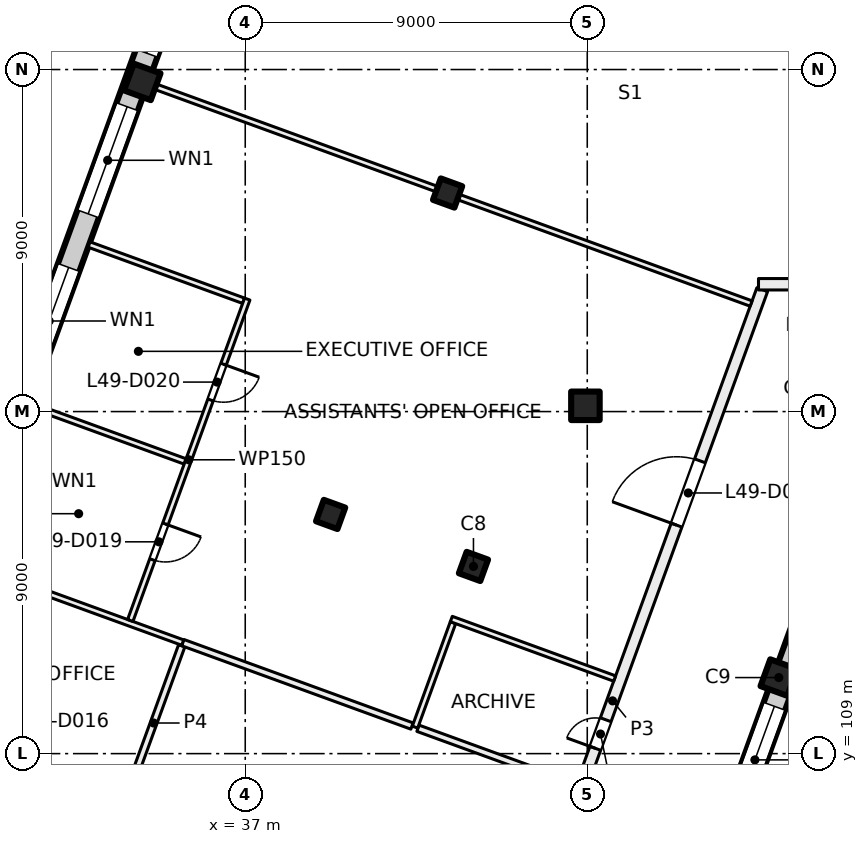
"""IFC4 building model, lengths in metres.
Left out: names, types, materials, properties, quantities, classifications, styles, units other than length and angle.
Written with IfcOpenShell. Run it as: python <this file> out.ifc"""

import sys

from ifc_helpers import new_model, si_unit, direction, frame, frame_2d, origin, origin_2d, place, context, subcontext, project, spatial, rectangle, extrude, element, fill, save


model = new_model("IFC4")
c1 = context("Model", 3, precision=1e-05, world=origin(), true_north=direction((0.0, 1.0)))
c2 = subcontext(c1, "Body", "Model", "MODEL_VIEW")
j1 = project(units=[si_unit("LENGTHUNIT", "METRE"), si_unit("PLANEANGLEUNIT", "RADIAN")], contexts=[c1])
p1 = place(None, origin())
s1 = spatial("IfcSite", under=j1, at=p1, CompositionType="ELEMENT")
p2 = place(p1, origin())
s2 = spatial("IfcBuilding", under=s1, at=p2, CompositionType="ELEMENT")
p3 = place(p2, frame((0.0, 0.0, 208.0)))
s3 = spatial("IfcBuildingStorey", under=s2, at=p3, CompositionType="ELEMENT", Elevation=208.0)
p4 = place(p3, frame((45.952, 118.152, 0.0), z_axis=(0.0, 0.0, 1.0), x_axis=(1.0, 0.0, 0.0)))
e1 = element("IfcColumn", 1, at=p4, inside=s3, PredefinedType="COLUMN", context=c2, shape_type="SweptSolid", body=[
    extrude(rectangle(XDim=0.75, YDim=0.75, at=origin_2d()), origin(), (0.0, 0.0, 1.0), 4.0),
])
for number, where, z_axis, x_axis in (
    (2, (43.006, 113.925, 0.0), (0.0, 0.0, 1.0), (-0.342, -0.94, 0.0)),
    (3, (42.325, 123.751, 0.0), (0.0, 0.0, 1.0), (-0.342, -0.94, 0.0)),
    (4, (39.247, 115.293, 0.0), (0.0, 0.0, 1.0), (-0.342, -0.94, 0.0)),
):
    element("IfcColumn", number, at=place(p3, frame(where, z_axis=z_axis, x_axis=x_axis)), inside=s3, PredefinedType="COLUMN", context=c2, shape_type="SweptSolid", body=[
        extrude(rectangle(XDim=0.6, YDim=0.6, at=origin_2d()), origin(), (0.0, 0.0, 1.0), 4.0),
    ])
for number, where, z_axis, x_axis in (
    (5, (51.04, 111.001, 0.0), (0.0, 0.0, 1.0), (-0.342, -0.94, 0.0)),
    (6, (34.291, 126.675, 0.0), (0.0, 0.0, 1.0), (-0.342, -0.94, 0.0)),
):
    element("IfcColumn", number, at=place(p3, frame(where, z_axis=z_axis, x_axis=x_axis)), inside=s3, PredefinedType="COLUMN", context=c2, shape_type="SweptSolid", body=[
        extrude(rectangle(XDim=0.75, YDim=0.75, at=origin_2d()), origin(), (0.0, 0.0, 1.0), 4.0),
    ])
p5 = place(p3, frame((52.212, 113.783, 0.0), z_axis=(0.0, 0.0, 1.0), x_axis=(-0.34202521188, -0.939690775968, 0.0)))
e7 = element("IfcWall", 7, at=p5, inside=s3, PredefinedType="SOLIDWALL", context=c2, shape_type="SweptSolid", body=[
    extrude(rectangle(XDim=21.745, YDim=0.6, at=frame_2d((10.873, 0.0))), origin(), (0.0, 0.0, 1.0), 3.625),
])
p6 = place(p5, frame((3.765, 0.0, 0.9)))
e8 = element("IfcOpeningElement", 8, at=p6, cuts=e7, PredefinedType="OPENING", context=c2, shape_type="SweptSolid", body=[
    extrude(rectangle(XDim=3.0, YDim=2.4, at=frame_2d((1.5, 1.2))), frame((0.0, 0.31, 0.0), z_axis=(0.0, -1.0, 0.0), x_axis=(1.0, 0.0, 0.0)), (0.0, 0.0, 1.0), 0.62),
])
p7 = place(p5, frame((8.265, 0.0, 0.9)))
e9 = element("IfcOpeningElement", 9, at=p7, cuts=e7, PredefinedType="OPENING", context=c2, shape_type="SweptSolid", body=[
    extrude(rectangle(XDim=3.0, YDim=2.4, at=frame_2d((1.5, 1.2))), frame((0.0, 0.31, 0.0), z_axis=(0.0, -1.0, 0.0), x_axis=(1.0, 0.0, 0.0)), (0.0, 0.0, 1.0), 0.62),
])
p8 = place(p5, frame((12.765, 0.0, 0.9)))
e10 = element("IfcOpeningElement", 10, at=p8, cuts=e7, PredefinedType="OPENING", context=c2, shape_type="SweptSolid", body=[
    extrude(rectangle(XDim=3.0, YDim=2.4, at=frame_2d((1.5, 1.2))), frame((0.0, 0.31, 0.0), z_axis=(0.0, -1.0, 0.0), x_axis=(1.0, 0.0, 0.0)), (0.0, 0.0, 1.0), 0.62),
])
p9 = place(p5, frame((17.265, 0.0, 0.9)))
e11 = element("IfcOpeningElement", 11, at=p9, cuts=e7, PredefinedType="OPENING", context=c2, shape_type="SweptSolid", body=[
    extrude(rectangle(XDim=3.0, YDim=2.4, at=frame_2d((1.5, 1.2))), frame((0.0, 0.31, 0.0), z_axis=(0.0, -1.0, 0.0), x_axis=(1.0, 0.0, 0.0)), (0.0, 0.0, 1.0), 0.62),
])
p10 = place(p3, frame((24.666, 100.669, 0.0), z_axis=(0.0, 0.0, 1.0), x_axis=(0.34201964167, 0.939692803373, 0.0)))
e12 = element("IfcWall", 12, at=p10, inside=s3, PredefinedType="SOLIDWALL", context=c2, shape_type="SweptSolid", body=[
    extrude(rectangle(XDim=32.884, YDim=0.6, at=frame_2d((16.442, 0.0))), origin(), (0.0, 0.0, 1.0), 3.625),
])
p11 = place(p10, frame((1.48, 0.0, 0.9)))
e13 = element("IfcOpeningElement", 13, at=p11, cuts=e12, PredefinedType="OPENING", context=c2, shape_type="SweptSolid", body=[
    extrude(rectangle(XDim=3.0, YDim=2.4, at=frame_2d((1.5, 1.2))), frame((0.0, 0.31, 0.0), z_axis=(0.0, -1.0, 0.0), x_axis=(1.0, 0.0, 0.0)), (0.0, 0.0, 1.0), 0.62),
])
p12 = place(p10, frame((5.98, 0.0, 0.9)))
e14 = element("IfcOpeningElement", 14, at=p12, cuts=e12, PredefinedType="OPENING", context=c2, shape_type="SweptSolid", body=[
    extrude(rectangle(XDim=3.0, YDim=2.4, at=frame_2d((1.5, 1.2))), frame((0.0, 0.31, 0.0), z_axis=(0.0, -1.0, 0.0), x_axis=(1.0, 0.0, 0.0)), (0.0, 0.0, 1.0), 0.62),
])
p13 = place(p10, frame((10.48, 0.0, 0.9)))
e15 = element("IfcOpeningElement", 15, at=p13, cuts=e12, PredefinedType="OPENING", context=c2, shape_type="SweptSolid", body=[
    extrude(rectangle(XDim=3.0, YDim=2.4, at=frame_2d((1.5, 1.2))), frame((0.0, 0.31, 0.0), z_axis=(0.0, -1.0, 0.0), x_axis=(1.0, 0.0, 0.0)), (0.0, 0.0, 1.0), 0.62),
])
p14 = place(p10, frame((14.98, 0.0, 0.9)))
e16 = element("IfcOpeningElement", 16, at=p14, cuts=e12, PredefinedType="OPENING", context=c2, shape_type="SweptSolid", body=[
    extrude(rectangle(XDim=3.0, YDim=2.4, at=frame_2d((1.5, 1.2))), frame((0.0, 0.31, 0.0), z_axis=(0.0, -1.0, 0.0), x_axis=(1.0, 0.0, 0.0)), (0.0, 0.0, 1.0), 0.62),
])
p15 = place(p10, frame((19.48, 0.0, 0.9)))
e17 = element("IfcOpeningElement", 17, at=p15, cuts=e12, PredefinedType="OPENING", context=c2, shape_type="SweptSolid", body=[
    extrude(rectangle(XDim=3.0, YDim=2.4, at=frame_2d((1.5, 1.2))), frame((0.0, 0.31, 0.0), z_axis=(0.0, -1.0, 0.0), x_axis=(1.0, 0.0, 0.0)), (0.0, 0.0, 1.0), 0.62),
])
p16 = place(p10, frame((23.98, 0.0, 0.9)))
e18 = element("IfcOpeningElement", 18, at=p16, cuts=e12, PredefinedType="OPENING", context=c2, shape_type="SweptSolid", body=[
    extrude(rectangle(XDim=3.0, YDim=2.4, at=frame_2d((1.5, 1.2))), frame((0.0, 0.31, 0.0), z_axis=(0.0, -1.0, 0.0), x_axis=(1.0, 0.0, 0.0)), (0.0, 0.0, 1.0), 0.62),
])
p17 = place(p10, frame((28.48, 0.0, 0.9)))
e19 = element("IfcOpeningElement", 19, at=p17, cuts=e12, PredefinedType="OPENING", context=c2, shape_type="SweptSolid", body=[
    extrude(rectangle(XDim=3.0, YDim=2.4, at=frame_2d((1.5, 1.2))), frame((0.0, 0.31, 0.0), z_axis=(0.0, -1.0, 0.0), x_axis=(1.0, 0.0, 0.0)), (0.0, 0.0, 1.0), 0.62),
])
p18 = place(p3, frame((29.814, 113.938, 0.0), z_axis=(0.0, 0.0, 1.0), x_axis=(0.939699162475, -0.342002169647, 0.0)))
e20 = element("IfcWall", 20, at=p18, inside=s3, PredefinedType="PARTITIONING", context=c2, shape_type="SweptSolid", body=[
    extrude(rectangle(XDim=5.901, YDim=0.15, at=frame_2d((2.95, 0.0))), origin(), (0.0, 0.0, 1.0), 3.625),
])
p19 = place(p3, frame((31.353, 118.166, 0.0), z_axis=(0.0, 0.0, 1.0), x_axis=(0.939803311208, -0.341715870634, 0.0)))
e21 = element("IfcWall", 21, at=p19, inside=s3, PredefinedType="PARTITIONING", context=c2, shape_type="SweptSolid", body=[
    extrude(rectangle(XDim=4.325, YDim=0.15, at=frame_2d((2.163, 0.0))), origin(), (0.0, 0.0, 1.0), 3.625),
])
p20 = place(p3, frame((32.892, 122.395, 0.0), z_axis=(0.0, 0.0, 1.0), x_axis=(0.93973078783, -0.341915262023, 0.0)))
e22 = element("IfcWall", 22, at=p20, inside=s3, PredefinedType="PARTITIONING", context=c2, shape_type="SweptSolid", body=[
    extrude(rectangle(XDim=4.326, YDim=0.15, at=frame_2d((2.163, 0.0))), origin(), (0.0, 0.0, 1.0), 3.625),
])
p21 = place(p3, frame((33.819, 107.691, 0.0), z_axis=(0.0, 0.0, 1.0), x_axis=(-0.939684641746, 0.342042064762, 0.0)))
e23 = element("IfcWall", 23, at=p21, inside=s3, PredefinedType="PARTITIONING", context=c2, shape_type="SweptSolid", body=[
    extrude(rectangle(XDim=5.9, YDim=0.15, at=frame_2d((2.95, 0.0))), origin(), (0.0, 0.0, 1.0), 3.625),
])
p22 = place(p21, frame((2.45, 0.0, 0.0)))
e24 = element("IfcOpeningElement", 24, at=p22, cuts=e23, PredefinedType="OPENING", context=c2, shape_type="SweptSolid", body=[
    extrude(rectangle(XDim=1.0, YDim=2.1, at=frame_2d((0.5, 1.05))), frame((0.0, 0.085, 0.0), z_axis=(0.0, -1.0, 0.0), x_axis=(1.0, 0.0, 0.0)), (0.0, 0.0, 1.0), 0.17),
])
p23 = place(p3, frame((35.329, 111.838, 0.0), z_axis=(0.0, 0.0, 1.0), x_axis=(-0.342114607243, -0.939658233355, 0.0)))
e25 = element("IfcWall", 25, at=p23, inside=s3, PredefinedType="PARTITIONING", context=c2, shape_type="SweptSolid", body=[
    extrude(rectangle(XDim=4.326, YDim=0.175, at=frame_2d((2.163, 0.0))), origin(), (0.0, 0.0, 1.0), 3.625),
])
p24 = place(p3, frame((37.053, 120.96, 0.0), z_axis=(0.0, 0.0, 1.0), x_axis=(-0.341997891731, -0.939700719406, 0.0)))
e26 = element("IfcWall", 26, at=p24, inside=s3, PredefinedType="PARTITIONING", context=c2, shape_type="SweptSolid", body=[
    extrude(rectangle(XDim=9.0, YDim=0.15, at=frame_2d((4.5, 0.0))), origin(), (0.0, 0.0, 1.0), 3.625),
])
p25 = place(p24, frame((6.297, 0.0, 0.0)))
e27 = element("IfcOpeningElement", 27, at=p25, cuts=e26, PredefinedType="OPENING", context=c2, shape_type="SweptSolid", body=[
    extrude(rectangle(XDim=1.0, YDim=2.1, at=frame_2d((0.5, 1.05))), frame((0.0, 0.085, 0.0), z_axis=(0.0, -1.0, 0.0), x_axis=(1.0, 0.0, 0.0)), (0.0, 0.0, 1.0), 0.17),
])
p26 = place(p24, frame((1.824, 0.0, 0.0)))
e28 = element("IfcOpeningElement", 28, at=p26, cuts=e26, PredefinedType="OPENING", context=c2, shape_type="SweptSolid", body=[
    extrude(rectangle(XDim=1.0, YDim=2.1, at=frame_2d((0.5, 1.05))), frame((0.0, 0.085, 0.0), z_axis=(0.0, -1.0, 0.0), x_axis=(1.0, 0.0, 0.0)), (0.0, 0.0, 1.0), 0.17),
])
p27 = place(p3, frame((41.546, 109.667, 0.0), z_axis=(0.0, 0.0, 1.0), x_axis=(0.939704600082, -0.341987228685, 0.0)))
e29 = element("IfcWall", 29, at=p27, inside=s3, PredefinedType="PARTITIONING", context=c2, shape_type="SweptSolid", body=[
    extrude(rectangle(XDim=4.415, YDim=0.175, at=frame_2d((2.208, 0.0))), origin(), (0.0, 0.0, 1.0), 3.625),
])
p28 = place(p3, frame((41.388, 109.726, 0.0), z_axis=(0.0, 0.0, 1.0), x_axis=(-0.939720073348, 0.341944708609, 0.0)))
e30 = element("IfcWall", 30, at=p28, inside=s3, PredefinedType="PARTITIONING", context=c2, shape_type="SweptSolid", body=[
    extrude(rectangle(XDim=6.416, YDim=0.175, at=frame_2d((3.208, 0.0))), origin(), (0.0, 0.0, 1.0), 3.625),
])
p29 = place(p3, frame((42.467, 112.446, 0.0), z_axis=(0.0, 0.0, 1.0), x_axis=(-0.341850278959, -0.939754428974, 0.0)))
e31 = element("IfcWall", 31, at=p29, inside=s3, PredefinedType="PARTITIONING", context=c2, shape_type="SweptSolid", body=[
    extrude(rectangle(XDim=2.925, YDim=0.15, at=frame_2d((1.463, 0.0))), origin(), (0.0, 0.0, 1.0), 3.625),
])
p30 = place(p3, frame((42.728, 99.567, 0.0), z_axis=(0.0, 0.0, 1.0), x_axis=(0.342015412648, 0.939694342598, 0.0)))
e32 = element("IfcWall", 32, at=p30, inside=s3, PredefinedType="PARTITIONING", context=c2, shape_type="SweptSolid", body=[
    extrude(rectangle(XDim=23.031, YDim=0.3, at=frame_2d((11.516, 0.0))), origin(), (0.0, 0.0, 1.0), 3.625),
])
p31 = place(p30, frame((1.738, 0.0, 0.0)))
e33 = element("IfcOpeningElement", 33, at=p31, cuts=e32, PredefinedType="OPENING", context=c2, shape_type="SweptSolid", body=[
    extrude(rectangle(XDim=1.2, YDim=2.1, at=frame_2d((0.6, 1.05))), frame((0.0, 0.16, 0.0), z_axis=(0.0, -1.0, 0.0), x_axis=(1.0, 0.0, 0.0)), (0.0, 0.0, 1.0), 0.32),
])
p32 = place(p30, frame((10.187, 0.0, 0.0)))
e34 = element("IfcOpeningElement", 34, at=p32, cuts=e32, PredefinedType="OPENING", context=c2, shape_type="SweptSolid", body=[
    extrude(rectangle(XDim=0.8, YDim=2.1, at=frame_2d((0.4, 1.05))), frame((0.0, 0.16, 0.0), z_axis=(0.0, -1.0, 0.0), x_axis=(1.0, 0.0, 0.0)), (0.0, 0.0, 1.0), 0.32),
])
p33 = place(p30, frame((16.437, 0.0, 0.0)))
e35 = element("IfcOpeningElement", 35, at=p33, cuts=e32, PredefinedType="OPENING", context=c2, shape_type="SweptSolid", body=[
    extrude(rectangle(XDim=1.8, YDim=2.1, at=frame_2d((0.9, 1.05))), frame((0.0, 0.16, 0.0), z_axis=(0.0, -1.0, 0.0), x_axis=(1.0, 0.0, 0.0)), (0.0, 0.0, 1.0), 0.32),
])
p34 = place(p3, frame((46.721, 110.976, 0.0), z_axis=(0.0, 0.0, 1.0), x_axis=(-0.939578187104, 0.342334383781, 0.0)))
e36 = element("IfcWall", 36, at=p34, inside=s3, PredefinedType="PARTITIONING", context=c2, shape_type="SweptSolid", body=[
    extrude(rectangle(XDim=4.574, YDim=0.15, at=frame_2d((2.287, 0.0))), origin(), (0.0, 0.0, 1.0), 3.625),
])
p35 = place(p3, frame((50.312, 120.843, 0.0), z_axis=(0.0, 0.0, 1.0), x_axis=(-0.939678226331, 0.342059689177, 0.0)))
e37 = element("IfcWall", 37, at=p35, inside=s3, PredefinedType="PARTITIONING", context=c2, shape_type="SweptSolid", body=[
    extrude(rectangle(XDim=16.901, YDim=0.15, at=frame_2d((8.45, 0.0))), origin(), (0.0, 0.0, 1.0), 3.625),
])
p36 = place(p3, frame((50.506, 121.35, 0.0), z_axis=(0.0, 0.0, 1.0), x_axis=(1.0, 0.0, 0.0)))
e38 = element("IfcWall", 38, at=p36, inside=s3, PredefinedType="PARTITIONING", context=c2, shape_type="SweptSolid", body=[
    extrude(rectangle(XDim=35.332, YDim=0.3, at=frame_2d((17.666, 0.0))), origin(), (0.0, 0.0, 1.0), 3.625),
])
p37 = place(p36, frame((32.394, 0.0, 0.0)))
e39 = element("IfcOpeningElement", 39, at=p37, cuts=e38, PredefinedType="OPENING", context=c2, shape_type="SweptSolid", body=[
    extrude(rectangle(XDim=1.2, YDim=2.1, at=frame_2d((0.6, 1.05))), frame((0.0, 0.16, 0.0), z_axis=(0.0, -1.0, 0.0), x_axis=(1.0, 0.0, 0.0)), (0.0, 0.0, 1.0), 0.32),
])
p38 = place(p36, frame((28.744, 0.0, 0.0)))
e40 = element("IfcOpeningElement", 40, at=p38, cuts=e38, PredefinedType="OPENING", context=c2, shape_type="SweptSolid", body=[
    extrude(rectangle(XDim=1.0, YDim=2.1, at=frame_2d((0.5, 1.05))), frame((0.0, 0.16, 0.0), z_axis=(0.0, -1.0, 0.0), x_axis=(1.0, 0.0, 0.0)), (0.0, 0.0, 1.0), 0.32),
])
p39 = place(p36, frame((23.844, 0.0, 0.0)))
e41 = element("IfcOpeningElement", 41, at=p39, cuts=e38, PredefinedType="OPENING", context=c2, shape_type="SweptSolid", body=[
    extrude(rectangle(XDim=1.8, YDim=2.1, at=frame_2d((0.9, 1.05))), frame((0.0, 0.16, 0.0), z_axis=(0.0, -1.0, 0.0), x_axis=(1.0, 0.0, 0.0)), (0.0, 0.0, 1.0), 0.32),
])
p40 = place(p36, frame((16.744, 0.0, 0.0)))
e42 = element("IfcOpeningElement", 42, at=p40, cuts=e38, PredefinedType="OPENING", context=c2, shape_type="SweptSolid", body=[
    extrude(rectangle(XDim=1.0, YDim=2.1, at=frame_2d((0.5, 1.05))), frame((0.0, 0.16, 0.0), z_axis=(0.0, -1.0, 0.0), x_axis=(1.0, 0.0, 0.0)), (0.0, 0.0, 1.0), 0.32),
])
p41 = place(p36, frame((7.344, 0.0, 0.0)))
e43 = element("IfcOpeningElement", 43, at=p41, cuts=e38, PredefinedType="OPENING", context=c2, shape_type="SweptSolid", body=[
    extrude(rectangle(XDim=1.8, YDim=2.1, at=frame_2d((0.9, 1.05))), frame((0.0, 0.16, 0.0), z_axis=(0.0, -1.0, 0.0), x_axis=(1.0, 0.0, 0.0)), (0.0, 0.0, 1.0), 0.32),
])
p42 = place(p36, frame((1.047, 0.0, 0.0)))
e44 = element("IfcOpeningElement", 44, at=p42, cuts=e38, PredefinedType="OPENING", context=c2, shape_type="SweptSolid", body=[
    extrude(rectangle(XDim=1.8, YDim=2.1, at=frame_2d((0.9, 1.05))), frame((0.0, 0.16, 0.0), z_axis=(0.0, -1.0, 0.0), x_axis=(1.0, 0.0, 0.0)), (0.0, 0.0, 1.0), 0.32),
])
p43 = place(p6, origin())
e45 = element("IfcWindow", 45, at=p43, inside=s3, PartitioningType="SINGLE_PANEL", PredefinedType="WINDOW", context=c2, shape_type="SweptSolid", body=[
    extrude(rectangle(XDim=3.0, YDim=2.4, at=frame_2d((1.5, 1.2))), frame((0.0, 0.03, 0.0), z_axis=(0.0, -1.0, 0.0), x_axis=(1.0, 0.0, 0.0)), (0.0, 0.0, 1.0), 0.06),
])
fill(e8, e45)
p44 = place(p15, origin())
e46 = element("IfcWindow", 46, at=p44, inside=s3, PartitioningType="SINGLE_PANEL", PredefinedType="WINDOW", context=c2, shape_type="SweptSolid", body=[
    extrude(rectangle(XDim=3.0, YDim=2.4, at=frame_2d((1.5, 1.2))), frame((0.0, 0.03, 0.0), z_axis=(0.0, -1.0, 0.0), x_axis=(1.0, 0.0, 0.0)), (0.0, 0.0, 1.0), 0.06),
])
fill(e17, e46)
p45 = place(p16, origin())
e47 = element("IfcWindow", 47, at=p45, inside=s3, PartitioningType="SINGLE_PANEL", PredefinedType="WINDOW", context=c2, shape_type="SweptSolid", body=[
    extrude(rectangle(XDim=3.0, YDim=2.4, at=frame_2d((1.5, 1.2))), frame((0.0, 0.03, 0.0), z_axis=(0.0, -1.0, 0.0), x_axis=(1.0, 0.0, 0.0)), (0.0, 0.0, 1.0), 0.06),
])
fill(e18, e47)
p46 = place(p17, origin())
e48 = element("IfcWindow", 48, at=p46, inside=s3, PartitioningType="SINGLE_PANEL", PredefinedType="WINDOW", context=c2, shape_type="SweptSolid", body=[
    extrude(rectangle(XDim=3.0, YDim=2.4, at=frame_2d((1.5, 1.2))), frame((0.0, 0.03, 0.0), z_axis=(0.0, -1.0, 0.0), x_axis=(1.0, 0.0, 0.0)), (0.0, 0.0, 1.0), 0.06),
])
fill(e19, e48)
p47 = place(p32, origin())
e49 = element("IfcDoor", 49, at=p47, inside=s3, OperationType="SINGLE_SWING_LEFT", PredefinedType="DOOR", context=c2, shape_type="SweptSolid", body=[
    extrude(rectangle(XDim=0.8, YDim=2.1, at=frame_2d((0.4, 1.05))), frame((0.0, 0.025, 0.0), z_axis=(0.0, -1.0, 0.0), x_axis=(1.0, 0.0, 0.0)), (0.0, 0.0, 1.0), 0.05),
])
fill(e34, e49)
p48 = place(p25, origin())
e50 = element("IfcDoor", 50, at=p48, inside=s3, OperationType="SINGLE_SWING_LEFT", PredefinedType="DOOR", context=c2, shape_type="SweptSolid", body=[
    extrude(rectangle(XDim=1.0, YDim=2.1, at=frame_2d((0.5, 1.05))), frame((0.0, 0.025, 0.0), z_axis=(0.0, -1.0, 0.0), x_axis=(1.0, 0.0, 0.0)), (0.0, 0.0, 1.0), 0.05),
])
fill(e27, e50)
p49 = place(p26, origin())
e51 = element("IfcDoor", 51, at=p49, inside=s3, OperationType="SINGLE_SWING_LEFT", PredefinedType="DOOR", context=c2, shape_type="SweptSolid", body=[
    extrude(rectangle(XDim=1.0, YDim=2.1, at=frame_2d((0.5, 1.05))), frame((0.0, 0.025, 0.0), z_axis=(0.0, -1.0, 0.0), x_axis=(1.0, 0.0, 0.0)), (0.0, 0.0, 1.0), 0.05),
])
fill(e28, e51)
p50 = place(p33, origin())
e52 = element("IfcDoor", 52, at=p50, inside=s3, OperationType="DOUBLE_DOOR_SINGLE_SWING", PredefinedType="DOOR", context=c2, shape_type="SweptSolid", body=[
    extrude(rectangle(XDim=1.8, YDim=2.1, at=frame_2d((0.9, 1.05))), frame((0.0, 0.025, 0.0), z_axis=(0.0, -1.0, 0.0), x_axis=(1.0, 0.0, 0.0)), (0.0, 0.0, 1.0), 0.05),
])
fill(e35, e52)
save(model, sys.argv[1])
